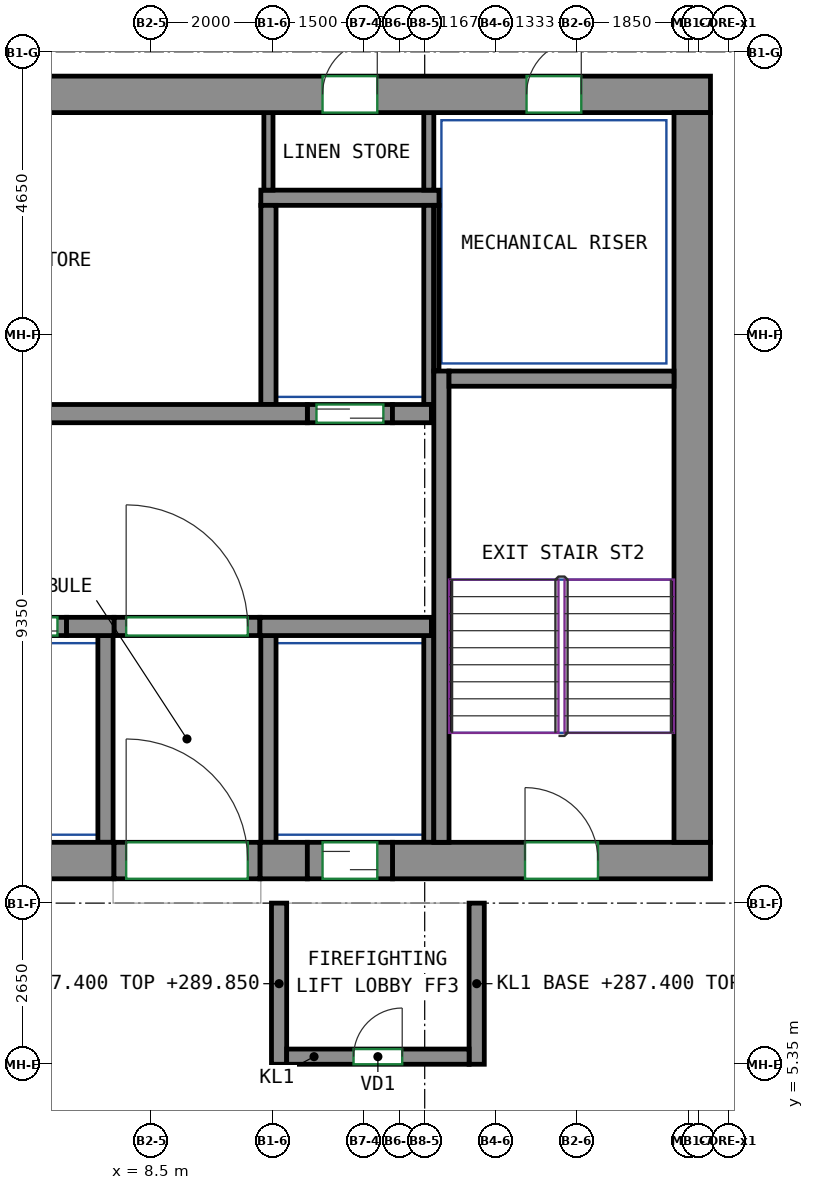
"""IFC4 building model, lengths in metres.
Left out: names, types, materials, properties, quantities, classifications, styles, units other than length and angle.
Written with IfcOpenShell. Run it as: python <this file> out.ifc"""

import sys

from ifc_helpers import new_model, si_unit, direction, frame, frame_2d, origin, place, context, subcontext, project, spatial, rectangle, extrude, source, transform, mapped, element, fill, save


model = new_model("IFC4")
c1 = context("Model", 3, precision=1e-05, world=origin(), true_north=direction((0.0, 1.0)))
c2 = subcontext(c1, "Body", "Model", "MODEL_VIEW")
j1 = project(units=[si_unit("LENGTHUNIT", "METRE"), si_unit("PLANEANGLEUNIT", "RADIAN")], contexts=[c1])
p1 = place(None, origin())
s1 = spatial("IfcSite", under=j1, at=p1, CompositionType="ELEMENT")
p2 = place(p1, origin())
s2 = spatial("IfcBuilding", under=s1, at=p2, CompositionType="ELEMENT")
p3 = place(p2, frame((0.0, 0.0, 287.4)))
s3 = spatial("IfcBuildingStorey", under=s2, at=p3, CompositionType="ELEMENT", Elevation=287.4)
m1 = source(origin(), c2, "Body", "SweptSolid", [
    extrude(rectangle(XDim=14.18, YDim=0.6, at=frame_2d((7.09, 0.0))), origin(), (0.0, 0.0, 1.0), 3.0),
])
p4 = place(p3, frame((-6.29, 8.7, 0.0), z_axis=(0.0, 0.0, 1.0), x_axis=(1.0, 0.0, 0.0)))
e1 = element("IfcWall", 1, at=p4, inside=s3, PredefinedType="SHEAR", context=c2, shape_type="MappedRepresentation", body=[
    mapped(m1, transform((0.0, 0.0, 0.0))),
])
m2 = source(origin(), c2, "Body", "SweptSolid", [
    extrude(rectangle(XDim=0.78, YDim=0.6, at=frame_2d((0.39, 0.0))), origin(), (0.0, 0.0, 1.0), 3.0),
])
p5 = place(p3, frame((10.29, 8.7, 0.0), z_axis=(0.0, 0.0, 1.0), x_axis=(1.0, 0.0, 0.0)))
e2 = element("IfcWall", 2, at=p5, inside=s3, PredefinedType="SHEAR", context=c2, shape_type="MappedRepresentation", body=[
    mapped(m2, transform((0.0, 0.0, 0.0))),
])
m3 = source(origin(), c2, "Body", "SweptSolid", [
    extrude(rectangle(XDim=5.23, YDim=0.6, at=frame_2d((2.615, 0.0))), origin(), (0.0, 0.0, 1.0), 3.0),
])
p6 = place(p3, frame((12.47, 8.7, 0.0), z_axis=(0.0, 0.0, 1.0), x_axis=(1.0, 0.0, 0.0)))
e3 = element("IfcWall", 3, at=p6, inside=s3, PredefinedType="SHEAR", context=c2, shape_type="MappedRepresentation", body=[
    mapped(m3, transform((0.0, 0.0, 0.0))),
])
p7 = place(p6, frame((2.18, 0.0, 0.0)))
e4 = element("IfcOpeningElement", 4, at=p7, cuts=e3, PredefinedType="OPENING", context=c2, shape_type="SweptSolid", body=[
    extrude(rectangle(XDim=1.2, YDim=2.1, at=frame_2d((0.6, 1.05))), frame((0.0, 0.31, 0.0), z_axis=(0.0, -1.0, 0.0), x_axis=(1.0, 0.0, 0.0)), (0.0, 0.0, 1.0), 0.62),
])
m4 = source(origin(), c2, "Body", "SweptSolid", [
    extrude(rectangle(XDim=33.3, YDim=0.6, at=frame_2d((16.65, 0.0))), origin(), (0.0, 0.0, 1.0), 3.0),
])
p8 = place(p3, frame((-15.6, 21.3, 0.0), z_axis=(0.0, 0.0, 1.0), x_axis=(1.0, 0.0, 0.0)))
e5 = element("IfcWall", 5, at=p8, inside=s3, PredefinedType="SHEAR", context=c2, shape_type="MappedRepresentation", body=[
    mapped(m4, transform((0.0, 0.0, 0.0))),
])
p9 = place(p8, frame((5.708, 0.0, 0.0)))
e6 = element("IfcOpeningElement", 6, at=p9, cuts=e5, PredefinedType="OPENING", context=c2, shape_type="SweptSolid", body=[
    extrude(rectangle(XDim=0.9, YDim=2.1, at=frame_2d((0.45, 1.05))), frame((0.0, 0.31, 0.0), z_axis=(0.0, -1.0, 0.0), x_axis=(1.0, 0.0, 0.0)), (0.0, 0.0, 1.0), 0.62),
])
p10 = place(p8, frame((10.773, 0.0, 0.0)))
e7 = element("IfcOpeningElement", 7, at=p10, cuts=e5, PredefinedType="OPENING", context=c2, shape_type="SweptSolid", body=[
    extrude(rectangle(XDim=0.9, YDim=2.1, at=frame_2d((0.45, 1.05))), frame((0.0, 0.31, 0.0), z_axis=(0.0, -1.0, 0.0), x_axis=(1.0, 0.0, 0.0)), (0.0, 0.0, 1.0), 0.62),
])
p11 = place(p8, frame((15.838, 0.0, 0.0)))
e8 = element("IfcOpeningElement", 8, at=p11, cuts=e5, PredefinedType="OPENING", context=c2, shape_type="SweptSolid", body=[
    extrude(rectangle(XDim=0.9, YDim=2.1, at=frame_2d((0.45, 1.05))), frame((0.0, 0.31, 0.0), z_axis=(0.0, -1.0, 0.0), x_axis=(1.0, 0.0, 0.0)), (0.0, 0.0, 1.0), 0.62),
])
p12 = place(p8, frame((21.493, 0.0, 0.0)))
e9 = element("IfcOpeningElement", 9, at=p12, cuts=e5, PredefinedType="OPENING", context=c2, shape_type="SweptSolid", body=[
    extrude(rectangle(XDim=0.9, YDim=2.1, at=frame_2d((0.45, 1.05))), frame((0.0, 0.31, 0.0), z_axis=(0.0, -1.0, 0.0), x_axis=(1.0, 0.0, 0.0)), (0.0, 0.0, 1.0), 0.62),
])
p13 = place(p8, frame((26.92, 0.0, 0.0)))
e10 = element("IfcOpeningElement", 10, at=p13, cuts=e5, PredefinedType="OPENING", context=c2, shape_type="SweptSolid", body=[
    extrude(rectangle(XDim=0.9, YDim=2.1, at=frame_2d((0.45, 1.05))), frame((0.0, 0.31, 0.0), z_axis=(0.0, -1.0, 0.0), x_axis=(1.0, 0.0, 0.0)), (0.0, 0.0, 1.0), 0.62),
])
p14 = place(p8, frame((2.125, 0.0, 0.0)))
e11 = element("IfcOpeningElement", 11, at=p14, cuts=e5, PredefinedType="OPENING", context=c2, shape_type="SweptSolid", body=[
    extrude(rectangle(XDim=0.9, YDim=2.1, at=frame_2d((0.45, 1.05))), frame((0.0, 0.31, 0.0), z_axis=(0.0, -1.0, 0.0), x_axis=(1.0, 0.0, 0.0)), (0.0, 0.0, 1.0), 0.62),
])
p15 = place(p8, frame((30.275, 0.0, 0.0)))
e12 = element("IfcOpeningElement", 12, at=p15, cuts=e5, PredefinedType="OPENING", context=c2, shape_type="SweptSolid", body=[
    extrude(rectangle(XDim=0.9, YDim=2.1, at=frame_2d((0.45, 1.05))), frame((0.0, 0.31, 0.0), z_axis=(0.0, -1.0, 0.0), x_axis=(1.0, 0.0, 0.0)), (0.0, 0.0, 1.0), 0.62),
])
m5 = source(origin(), c2, "Body", "SweptSolid", [
    extrude(rectangle(XDim=12.0, YDim=0.6, at=frame_2d((6.0, 0.0))), origin(), (0.0, 0.0, 1.0), 3.0),
])
p16 = place(p3, frame((17.4, 9.0, 0.0), z_axis=(0.0, 0.0, 1.0), x_axis=(0.0, 1.0, 0.0)))
e13 = element("IfcWall", 13, at=p16, inside=s3, PredefinedType="SHEAR", context=c2, shape_type="MappedRepresentation", body=[
    mapped(m5, transform((0.0, 0.0, 0.0))),
])
m6 = source(origin(), c2, "Body", "SweptSolid", [
    extrude(rectangle(XDim=7.75, YDim=0.25, at=frame_2d((3.875, 0.0))), origin(), (0.0, 0.0, 1.0), 3.0),
])
p17 = place(p3, frame((13.275, 9.0, 0.0), z_axis=(0.0, 0.0, 1.0), x_axis=(0.0, 1.0, 0.0)))
e14 = element("IfcWall", 14, at=p17, inside=s3, PredefinedType="SHEAR", context=c2, shape_type="MappedRepresentation", body=[
    mapped(m6, transform((0.0, 0.0, 0.0))),
])
m7 = source(origin(), c2, "Body", "SweptSolid", [
    extrude(rectangle(XDim=3.7, YDim=0.25, at=frame_2d((1.85, 0.0))), origin(), (0.0, 0.0, 1.0), 3.0),
])
p18 = place(p3, frame((13.4, 16.625, 0.0), z_axis=(0.0, 0.0, 1.0), x_axis=(1.0, 0.0, 0.0)))
e15 = element("IfcWall", 15, at=p18, inside=s3, PredefinedType="SHEAR", context=c2, shape_type="MappedRepresentation", body=[
    mapped(m7, transform((0.0, 0.0, 0.0))),
])
m8 = source(origin(), c2, "Body", "SweptSolid", [
    extrude(rectangle(XDim=0.78, YDim=0.3, at=frame_2d((0.39, 0.0))), origin(), (0.0, 0.0, 1.0), 3.0),
])
p19 = place(p3, frame((7.11, 12.55, 0.0), z_axis=(0.0, 0.0, 1.0), x_axis=(1.0, 0.0, 0.0)))
e16 = element("IfcWall", 16, at=p19, inside=s3, PredefinedType="SHEAR", context=c2, shape_type="MappedRepresentation", body=[
    mapped(m8, transform((0.0, 0.0, 0.0))),
])
m9 = source(origin(), c2, "Body", "SweptSolid", [
    extrude(rectangle(XDim=2.82, YDim=0.3, at=frame_2d((1.41, 0.0))), origin(), (0.0, 0.0, 1.0), 3.0),
])
p20 = place(p3, frame((10.29, 12.55, 0.0), z_axis=(0.0, 0.0, 1.0), x_axis=(1.0, 0.0, 0.0)))
e17 = element("IfcWall", 17, at=p20, inside=s3, PredefinedType="SHEAR", context=c2, shape_type="MappedRepresentation", body=[
    mapped(m9, transform((0.0, 0.0, 0.0))),
])
m10 = source(origin(), c2, "Body", "SweptSolid", [
    extrude(rectangle(XDim=22.08, YDim=0.3, at=frame_2d((11.04, 0.0))), origin(), (0.0, 0.0, 1.0), 3.0),
])
p21 = place(p3, frame((-11.01, 16.05, 0.0), z_axis=(0.0, 0.0, 1.0), x_axis=(1.0, 0.0, 0.0)))
e18 = element("IfcWall", 18, at=p21, inside=s3, PredefinedType="SHEAR", context=c2, shape_type="MappedRepresentation", body=[
    mapped(m10, transform((0.0, 0.0, 0.0))),
])
m11 = source(origin(), c2, "Body", "SweptSolid", [
    extrude(rectangle(XDim=0.64, YDim=0.3, at=frame_2d((0.32, 0.0))), origin(), (0.0, 0.0, 1.0), 3.0),
])
p22 = place(p3, frame((12.47, 16.05, 0.0), z_axis=(0.0, 0.0, 1.0), x_axis=(1.0, 0.0, 0.0)))
e19 = element("IfcWall", 19, at=p22, inside=s3, PredefinedType="SHEAR", context=c2, shape_type="MappedRepresentation", body=[
    mapped(m11, transform((0.0, 0.0, 0.0))),
])
m12 = source(origin(), c2, "Body", "SweptSolid", [
    extrude(rectangle(XDim=1.4, YDim=0.3, at=frame_2d((0.7, 0.0))), origin(), (0.0, 0.0, 1.0), 3.0),
])
p23 = place(p3, frame((5.71, 12.55, 0.0), z_axis=(0.0, 0.0, 1.0), x_axis=(1.0, 0.0, 0.0)))
e20 = element("IfcWall", 20, at=p23, inside=s3, PredefinedType="PARTITIONING", context=c2, shape_type="MappedRepresentation", body=[
    mapped(m12, transform((0.0, 0.0, 0.0))),
])
p24 = place(p23, frame((0.15, 0.0, 0.0)))
e21 = element("IfcOpeningElement", 21, at=p24, cuts=e20, PredefinedType="OPENING", context=c2, shape_type="SweptSolid", body=[
    extrude(rectangle(XDim=1.1, YDim=2.1, at=frame_2d((0.55, 1.05))), frame((0.0, 0.16, 0.0), z_axis=(0.0, -1.0, 0.0), x_axis=(1.0, 0.0, 0.0)), (0.0, 0.0, 1.0), 0.32),
])
m13 = source(origin(), c2, "Body", "SweptSolid", [
    extrude(rectangle(XDim=1.4, YDim=0.3, at=frame_2d((0.7, 0.0))), origin(), (0.0, 0.0, 1.0), 3.0),
])
p25 = place(p3, frame((11.07, 16.05, 0.0), z_axis=(0.0, 0.0, 1.0), x_axis=(1.0, 0.0, 0.0)))
e22 = element("IfcWall", 22, at=p25, inside=s3, PredefinedType="PARTITIONING", context=c2, shape_type="MappedRepresentation", body=[
    mapped(m13, transform((0.0, 0.0, 0.0))),
])
p26 = place(p25, frame((0.15, 0.0, 0.0)))
e23 = element("IfcOpeningElement", 23, at=p26, cuts=e22, PredefinedType="OPENING", context=c2, shape_type="SweptSolid", body=[
    extrude(rectangle(XDim=1.1, YDim=2.1, at=frame_2d((0.55, 1.05))), frame((0.0, 0.16, 0.0), z_axis=(0.0, -1.0, 0.0), x_axis=(1.0, 0.0, 0.0)), (0.0, 0.0, 1.0), 0.32),
])
m14 = source(origin(), c2, "Body", "SweptSolid", [
    extrude(rectangle(XDim=2.4, YDim=0.3, at=frame_2d((1.2, 0.0))), origin(), (0.0, 0.0, 1.0), 3.0),
])
p27 = place(p3, frame((7.89, 12.55, 0.0), z_axis=(0.0, 0.0, 1.0), x_axis=(1.0, 0.0, 0.0)))
e24 = element("IfcWall", 24, at=p27, inside=s3, PredefinedType="PARTITIONING", context=c2, shape_type="MappedRepresentation", body=[
    mapped(m14, transform((0.0, 0.0, 0.0))),
])
p28 = place(p27, frame((0.2, 0.0, 0.0)))
e25 = element("IfcOpeningElement", 25, at=p28, cuts=e24, PredefinedType="OPENING", context=c2, shape_type="SweptSolid", body=[
    extrude(rectangle(XDim=2.0, YDim=2.1, at=frame_2d((1.0, 1.05))), frame((0.0, 0.16, 0.0), z_axis=(0.0, -1.0, 0.0), x_axis=(1.0, 0.0, 0.0)), (0.0, 0.0, 1.0), 0.32),
])
m15 = source(origin(), c2, "Body", "SweptSolid", [
    extrude(rectangle(XDim=2.65, YDim=0.25, at=frame_2d((1.325, 0.0))), origin(), (0.0, 0.0, 1.0), 2.45),
])
for number, where, z_axis, x_axis in (
    (26, (10.605, 5.35, 0.0), (0.0, 0.0, 1.0), (0.0, 1.0, 0.0)),
    (27, (13.855, 5.35, 0.0), (0.0, 0.0, 1.0), (0.0, 1.0, 0.0)),
):
    element("IfcWall", number, at=place(p3, frame(where, z_axis=z_axis, x_axis=x_axis)), inside=s3, PredefinedType="PARTITIONING", context=c2, shape_type="MappedRepresentation", body=[
        mapped(m15, transform((0.0, 0.0, 0.0))),
    ])
m16 = source(origin(), c2, "Body", "SweptSolid", [
    extrude(rectangle(XDim=3.0, YDim=0.25, at=frame_2d((1.5, 0.0))), origin(), (0.0, 0.0, 1.0), 3.0),
])
p29 = place(p3, frame((10.73, 5.475, 0.0), z_axis=(0.0, 0.0, 1.0), x_axis=(1.0, 0.0, 0.0)))
e28 = element("IfcWall", 28, at=p29, inside=s3, PredefinedType="PARTITIONING", context=c2, shape_type="MappedRepresentation", body=[
    mapped(m16, transform((0.0, 0.0, 0.0))),
])
p30 = place(p29, frame((1.1, 0.0, 0.0)))
e29 = element("IfcOpeningElement", 29, at=p30, cuts=e28, PredefinedType="OPENING", context=c2, shape_type="SweptSolid", body=[
    extrude(rectangle(XDim=0.8, YDim=2.0, at=frame_2d((0.4, 1.0))), frame((0.0, 0.135, 0.0), z_axis=(0.0, -1.0, 0.0), x_axis=(1.0, 0.0, 0.0)), (0.0, 0.0, 1.0), 0.27),
])
m17 = source(origin(), c2, "Body", "SweptSolid", [
    extrude(rectangle(XDim=2.93, YDim=0.25, at=frame_2d((1.465, 0.0))), origin(), (0.0, 0.0, 1.0), 3.0),
])
p31 = place(p3, frame((10.305, 19.6, 0.0), z_axis=(0.0, 0.0, 1.0), x_axis=(1.0, 0.0, 0.0)))
e30 = element("IfcWall", 30, at=p31, inside=s3, PredefinedType="PARTITIONING", context=c2, shape_type="MappedRepresentation", body=[
    mapped(m17, transform((0.0, 0.0, 0.0))),
])
m18 = source(origin(), c2, "Body", "SweptSolid", [
    extrude(rectangle(XDim=3.275, YDim=0.165, at=frame_2d((1.638, 0.0))), origin(), (0.0, 0.0, 1.0), 3.0),
])
p32 = place(p3, frame((13.067, 16.2, 0.0), z_axis=(0.0, 0.0, 1.0), x_axis=(0.0, 1.0, 0.0)))
e31 = element("IfcWall", 31, at=p32, inside=s3, PredefinedType="PARTITIONING", context=c2, shape_type="MappedRepresentation", body=[
    mapped(m18, transform((0.0, 0.0, 0.0))),
])
m19 = source(origin(), c2, "Body", "SweptSolid", [
    extrude(rectangle(XDim=1.275, YDim=0.165, at=frame_2d((0.637, 0.0))), origin(), (0.0, 0.0, 1.0), 3.0),
])
p33 = place(p3, frame((13.067, 19.725, 0.0), z_axis=(0.0, 0.0, 1.0), x_axis=(0.0, 1.0, 0.0)))
e32 = element("IfcWall", 32, at=p33, inside=s3, PredefinedType="PARTITIONING", context=c2, shape_type="MappedRepresentation", body=[
    mapped(m19, transform((0.0, 0.0, 0.0))),
])
m20 = source(origin(), c2, "Body", "SweptSolid", [
    extrude(rectangle(XDim=3.275, YDim=0.25, at=frame_2d((1.638, 0.0))), origin(), (0.0, 0.0, 1.0), 3.0),
])
p34 = place(p3, frame((10.43, 16.2, 0.0), z_axis=(0.0, 0.0, 1.0), x_axis=(0.0, 1.0, 0.0)))
e33 = element("IfcWall", 33, at=p34, inside=s3, PredefinedType="PARTITIONING", context=c2, shape_type="MappedRepresentation", body=[
    mapped(m20, transform((0.0, 0.0, 0.0))),
])
m21 = source(origin(), c2, "Body", "SweptSolid", [
    extrude(rectangle(XDim=2.725, YDim=0.085, at=frame_2d((1.363, 0.0))), origin(), (0.0, 0.0, 1.0), 3.0),
])
p35 = place(p3, frame((13.192, 16.75, 0.0), z_axis=(0.0, 0.0, 1.0), x_axis=(0.0, 1.0, 0.0)))
e34 = element("IfcWall", 34, at=p35, inside=s3, PredefinedType="PARTITIONING", context=c2, shape_type="MappedRepresentation", body=[
    mapped(m21, transform((0.0, 0.0, 0.0))),
])
m22 = source(origin(), c2, "Body", "SweptSolid", [
    extrude(rectangle(XDim=3.4, YDim=0.25, at=frame_2d((1.7, 0.0))), origin(), (0.0, 0.0, 1.0), 3.0),
])
p36 = place(p3, frame((10.43, 9.0, 0.0), z_axis=(0.0, 0.0, 1.0), x_axis=(0.0, 1.0, 0.0)))
e35 = element("IfcWall", 35, at=p36, inside=s3, PredefinedType="PARTITIONING", context=c2, shape_type="MappedRepresentation", body=[
    mapped(m22, transform((0.0, 0.0, 0.0))),
])
m23 = source(origin(), c2, "Body", "SweptSolid", [
    extrude(rectangle(XDim=3.4, YDim=0.165, at=frame_2d((1.7, 0.0))), origin(), (0.0, 0.0, 1.0), 3.0),
])
p37 = place(p3, frame((13.067, 9.0, 0.0), z_axis=(0.0, 0.0, 1.0), x_axis=(0.0, 1.0, 0.0)))
e36 = element("IfcWall", 36, at=p37, inside=s3, PredefinedType="PARTITIONING", context=c2, shape_type="MappedRepresentation", body=[
    mapped(m23, transform((0.0, 0.0, 0.0))),
])
p38 = place(p3, frame((7.75, 9.0, 0.0), z_axis=(0.0, 0.0, 1.0), x_axis=(0.0, 1.0, 0.0)))
e37 = element("IfcWall", 37, at=p38, inside=s3, PredefinedType="PARTITIONING", context=c2, shape_type="MappedRepresentation", body=[
    mapped(m22, transform((0.0, 0.0, 0.0))),
])
m24 = source(origin(), c2, "Body", "SweptSolid", [
    extrude(rectangle(XDim=1.275, YDim=0.15, at=frame_2d((0.637, 0.0))), origin(), (0.0, 0.0, 1.0), 3.0),
])
p39 = place(p3, frame((10.43, 19.725, 0.0), z_axis=(0.0, 0.0, 1.0), x_axis=(0.0, 1.0, 0.0)))
e38 = element("IfcWall", 38, at=p39, inside=s3, PredefinedType="PARTITIONING", context=c2, shape_type="MappedRepresentation", body=[
    mapped(m24, transform((0.0, 0.0, 0.0))),
])
m25 = source(origin(), c2, "Body", "SweptSolid", [
    extrude(rectangle(XDim=2.4, YDim=0.6, at=frame_2d((1.2, 0.0))), origin(), (0.0, 0.0, 1.0), 2.7),
])
p40 = place(p3, frame((7.89, 8.7, 0.0), z_axis=(0.0, 0.0, 1.0), x_axis=(1.0, 0.0, 0.0)))
e39 = element("IfcWall", 39, at=p40, inside=s3, PredefinedType="PARTITIONING", context=c2, shape_type="MappedRepresentation", body=[
    mapped(m25, transform((0.0, 0.0, 0.0))),
])
p41 = place(p40, frame((0.2, 0.0, 0.0)))
e40 = element("IfcOpeningElement", 40, at=p41, cuts=e39, PredefinedType="OPENING", context=c2, shape_type="SweptSolid", body=[
    extrude(rectangle(XDim=2.0, YDim=2.1, at=frame_2d((1.0, 1.05))), frame((0.0, 0.31, 0.0), z_axis=(0.0, -1.0, 0.0), x_axis=(1.0, 0.0, 0.0)), (0.0, 0.0, 1.0), 0.62),
])
m26 = source(origin(), c2, "Body", "SweptSolid", [
    extrude(rectangle(XDim=1.4, YDim=0.6, at=frame_2d((0.7, 0.0))), origin(), (0.0, 0.0, 1.0), 2.7),
])
p42 = place(p3, frame((11.07, 8.7, 0.0), z_axis=(0.0, 0.0, 1.0), x_axis=(1.0, 0.0, 0.0)))
e41 = element("IfcWall", 41, at=p42, inside=s3, PredefinedType="PARTITIONING", context=c2, shape_type="MappedRepresentation", body=[
    mapped(m26, transform((0.0, 0.0, 0.0))),
])
p43 = place(p42, frame((0.25, 0.0, 0.0)))
e42 = element("IfcOpeningElement", 42, at=p43, cuts=e41, PredefinedType="OPENING", context=c2, shape_type="SweptSolid", body=[
    extrude(rectangle(XDim=0.9, YDim=2.1, at=frame_2d((0.45, 1.05))), frame((0.0, 0.31, 0.0), z_axis=(0.0, -1.0, 0.0), x_axis=(1.0, 0.0, 0.0)), (0.0, 0.0, 1.0), 0.62),
])
p44 = place(p28, origin())
e43 = element("IfcDoor", 43, at=p44, inside=s3, OperationType="DOUBLE_DOOR_SINGLE_SWING", PredefinedType="DOOR", context=c2, shape_type="SweptSolid", body=[
    extrude(rectangle(XDim=2.0, YDim=2.1, at=frame_2d((1.0, 1.05))), frame((0.0, 0.025, 0.0), z_axis=(0.0, -1.0, 0.0), x_axis=(1.0, 0.0, 0.0)), (0.0, 0.0, 1.0), 0.05),
])
fill(e25, e43)
p45 = place(p41, origin())
e44 = element("IfcDoor", 44, at=p45, inside=s3, OperationType="DOUBLE_DOOR_SINGLE_SWING", PredefinedType="DOOR", context=c2, shape_type="SweptSolid", body=[
    extrude(rectangle(XDim=2.0, YDim=2.1, at=frame_2d((1.0, 1.05))), frame((0.0, 0.205, 0.0), z_axis=(0.0, -1.0, 0.0), x_axis=(1.0, 0.0, 0.0)), (0.0, 0.0, 1.0), 0.05),
])
fill(e40, e44)
p46 = place(p30, origin())
e45 = element("IfcDoor", 45, at=p46, inside=s3, OperationType="SINGLE_SWING_RIGHT", PredefinedType="DOOR", context=c2, shape_type="SweptSolid", body=[
    extrude(rectangle(XDim=0.8, YDim=2.0, at=frame_2d((0.4, 1.0))), frame((0.0, 0.025, 0.0), z_axis=(0.0, -1.0, 0.0), x_axis=(1.0, 0.0, 0.0)), (0.0, 0.0, 1.0), 0.05),
])
fill(e29, e45)
p47 = place(p43, origin())
e46 = element("IfcDoor", 46, at=p47, inside=s3, OperationType="SLIDING_TO_LEFT", PredefinedType="DOOR", context=c2, shape_type="SweptSolid", body=[
    extrude(rectangle(XDim=0.9, YDim=2.1, at=frame_2d((0.45, 1.05))), frame((0.0, 0.205, 0.0), z_axis=(0.0, -1.0, 0.0), x_axis=(1.0, 0.0, 0.0)), (0.0, 0.0, 1.0), 0.05),
])
fill(e42, e46)
p48 = place(p24, origin())
e47 = element("IfcDoor", 47, at=p48, inside=s3, OperationType="DOUBLE_DOOR_SLIDING", PredefinedType="DOOR", context=c2, shape_type="SweptSolid", body=[
    extrude(rectangle(XDim=1.1, YDim=2.1, at=frame_2d((0.55, 1.05))), frame((0.0, 0.025, 0.0), z_axis=(0.0, -1.0, 0.0), x_axis=(1.0, 0.0, 0.0)), (0.0, 0.0, 1.0), 0.05),
])
fill(e21, e47)
p49 = place(p26, origin())
e48 = element("IfcDoor", 48, at=p49, inside=s3, OperationType="DOUBLE_DOOR_SLIDING", PredefinedType="DOOR", context=c2, shape_type="SweptSolid", body=[
    extrude(rectangle(XDim=1.1, YDim=2.1, at=frame_2d((0.55, 1.05))), frame((0.0, 0.025, 0.0), z_axis=(0.0, -1.0, 0.0), x_axis=(1.0, 0.0, 0.0)), (0.0, 0.0, 1.0), 0.05),
])
fill(e23, e48)
p50 = place(p13, origin())
e49 = element("IfcDoor", 49, at=p50, inside=s3, OperationType="SINGLE_SWING_RIGHT", PredefinedType="DOOR", context=c2, shape_type="SweptSolid", body=[
    extrude(rectangle(XDim=0.9, YDim=2.1, at=frame_2d((0.45, 1.05))), frame((0.0, -0.155, 0.0), z_axis=(0.0, -1.0, 0.0), x_axis=(1.0, 0.0, 0.0)), (0.0, 0.0, 1.0), 0.05),
])
fill(e10, e49)
p51 = place(p15, origin())
e50 = element("IfcDoor", 50, at=p51, inside=s3, OperationType="SINGLE_SWING_RIGHT", PredefinedType="DOOR", context=c2, shape_type="SweptSolid", body=[
    extrude(rectangle(XDim=0.9, YDim=2.1, at=frame_2d((0.45, 1.05))), frame((0.0, -0.155, 0.0), z_axis=(0.0, -1.0, 0.0), x_axis=(1.0, 0.0, 0.0)), (0.0, 0.0, 1.0), 0.05),
])
fill(e12, e50)
p52 = place(p7, origin())
e51 = element("IfcDoor", 51, at=p52, inside=s3, OperationType="DOUBLE_DOOR_SINGLE_SWING", PredefinedType="DOOR", context=c2, shape_type="SweptSolid", body=[
    extrude(rectangle(XDim=1.2, YDim=2.1, at=frame_2d((0.6, 1.05))), frame((0.0, 0.205, 0.0), z_axis=(0.0, -1.0, 0.0), x_axis=(1.0, 0.0, 0.0)), (0.0, 0.0, 1.0), 0.05),
])
fill(e4, e51)
save(model, sys.argv[1])
